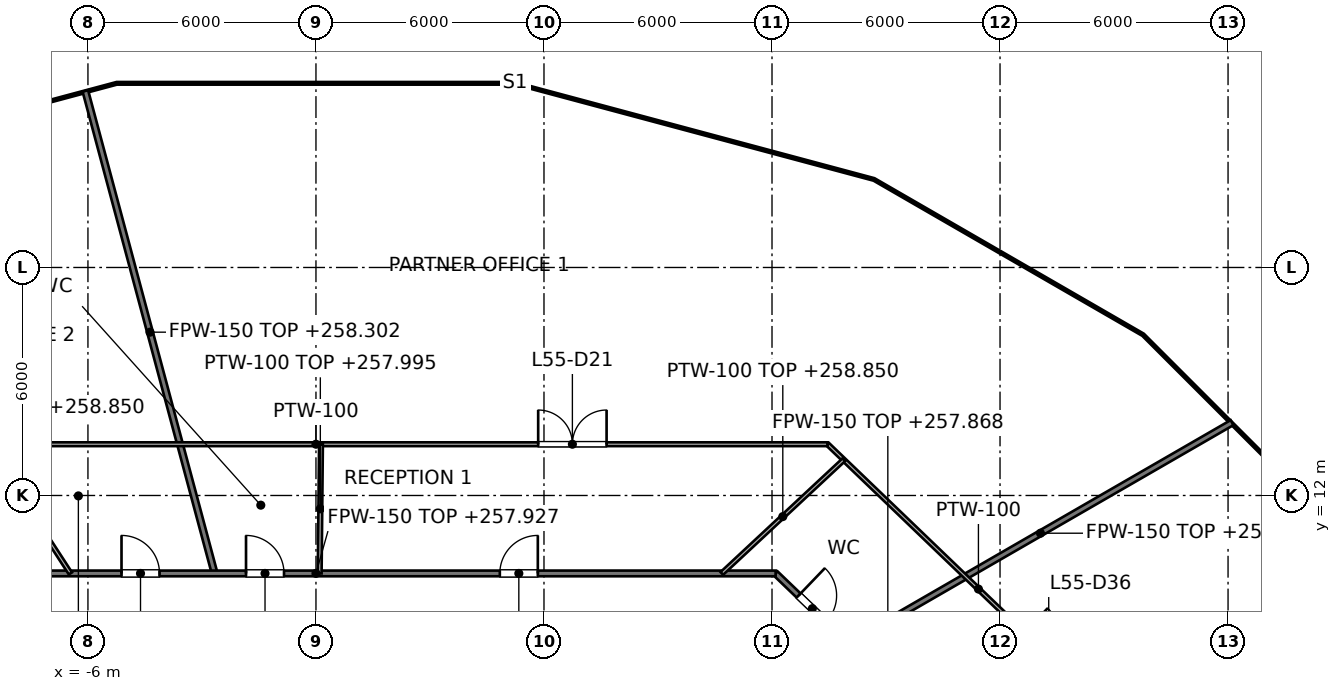
"""IFC4 building model, lengths in metres.
Left out: names, types, materials, properties, quantities, classifications, styles, units other than length and angle.
Written with IfcOpenShell. Run it as: python <this file> out.ifc"""

import sys

from ifc_helpers import new_model, si_unit, direction, frame, frame_2d, origin, place, context, subcontext, project, spatial, rectangle, extrude, element, fill, save


model = new_model("IFC4")
c1 = context("Model", 3, precision=1e-05, world=origin(), true_north=direction((0.0, 1.0)))
c2 = subcontext(c1, "Body", "Model", "MODEL_VIEW")
j1 = project(units=[si_unit("LENGTHUNIT", "METRE"), si_unit("PLANEANGLEUNIT", "RADIAN")], contexts=[c1])
p1 = place(None, origin())
s1 = spatial("IfcSite", under=j1, at=p1, CompositionType="ELEMENT")
p2 = place(p1, origin())
s2 = spatial("IfcBuilding", under=s1, at=p2, CompositionType="ELEMENT")
p3 = place(p2, frame((0.0, 0.0, 255.0)))
s3 = spatial("IfcBuildingStorey", under=s2, at=p3, CompositionType="ELEMENT", Elevation=255.0)
p4 = place(p3, frame((-6.068, 22.646, 0.0), z_axis=(0.0, 0.0, 1.0), x_axis=(0.258814996199, -0.965926911181, 0.0)))
e1 = element("IfcWall", 1, at=p4, inside=s3, PredefinedType="PARTITIONING", context=c2, shape_type="SweptSolid", body=[
    extrude(rectangle(XDim=13.145, YDim=0.15, at=frame_2d((6.573, 0.0))), origin(), (0.0, 0.0, 1.0), 3.302),
])
p5 = place(p3, frame((12.095, 9.949, 0.0), z_axis=(0.0, 0.0, 1.0), x_axis=(0.721290181137, -0.692633001376, 0.0)))
e2 = element("IfcWall", 2, at=p5, inside=s3, PredefinedType="PARTITIONING", context=c2, shape_type="SweptSolid", body=[
    extrude(rectangle(XDim=8.187, YDim=0.15, at=frame_2d((4.094, 0.0))), origin(), (0.0, 0.0, 1.0), 2.868),
])
p6 = place(p5, frame((0.839, 0.0, 0.0)))
e3 = element("IfcOpeningElement", 3, at=p6, cuts=e2, PredefinedType="OPENING", context=c2, shape_type="SweptSolid", body=[
    extrude(rectangle(XDim=1.0, YDim=2.1, at=frame_2d((0.5, 1.05))), frame((0.0, 0.075, 0.0), z_axis=(0.0, -1.0, 0.0), x_axis=(1.0, 0.0, 0.0)), (0.0, 0.0, 1.0), 0.15),
])
p7 = place(p5, frame((3.542, 0.0, 0.0)))
e4 = element("IfcOpeningElement", 4, at=p7, cuts=e2, PredefinedType="OPENING", context=c2, shape_type="SweptSolid", body=[
    extrude(rectangle(XDim=1.0, YDim=2.1, at=frame_2d((0.5, 1.05))), frame((0.0, 0.075, 0.0), z_axis=(0.0, -1.0, 0.0), x_axis=(1.0, 0.0, 0.0)), (0.0, 0.0, 1.0), 0.15),
])
p8 = place(p3, frame((-12.095, 9.949, 0.0), z_axis=(0.0, 0.0, 1.0), x_axis=(1.0, 0.0, 0.0)))
e5 = element("IfcWall", 5, at=p8, inside=s3, PredefinedType="PARTITIONING", context=c2, shape_type="SweptSolid", body=[
    extrude(rectangle(XDim=24.19, YDim=0.15, at=frame_2d((12.095, 0.0))), origin(), (0.0, 0.0, 1.0), 2.927),
])
p9 = place(p8, frame((16.933, 0.0, 0.0)))
e6 = element("IfcOpeningElement", 6, at=p9, cuts=e5, PredefinedType="OPENING", context=c2, shape_type="SweptSolid", body=[
    extrude(rectangle(XDim=1.0, YDim=2.1, at=frame_2d((0.5, 1.05))), frame((0.0, 0.075, 0.0), z_axis=(0.0, -1.0, 0.0), x_axis=(1.0, 0.0, 0.0)), (0.0, 0.0, 1.0), 0.15),
])
p10 = place(p8, frame((10.255, 0.0, 0.0)))
e7 = element("IfcOpeningElement", 7, at=p10, cuts=e5, PredefinedType="OPENING", context=c2, shape_type="SweptSolid", body=[
    extrude(rectangle(XDim=1.0, YDim=2.1, at=frame_2d((0.5, 1.05))), frame((0.0, 0.075, 0.0), z_axis=(0.0, -1.0, 0.0), x_axis=(1.0, 0.0, 0.0)), (0.0, 0.0, 1.0), 0.15),
])
p11 = place(p8, frame((6.978, 0.0, 0.0)))
e8 = element("IfcOpeningElement", 8, at=p11, cuts=e5, PredefinedType="OPENING", context=c2, shape_type="SweptSolid", body=[
    extrude(rectangle(XDim=1.0, YDim=2.1, at=frame_2d((0.5, 1.05))), frame((0.0, 0.075, 0.0), z_axis=(0.0, -1.0, 0.0), x_axis=(1.0, 0.0, 0.0)), (0.0, 0.0, 1.0), 0.15),
])
p12 = place(p8, frame((2.317, 0.0, 0.0)))
e9 = element("IfcOpeningElement", 9, at=p12, cuts=e5, PredefinedType="OPENING", context=c2, shape_type="SweptSolid", body=[
    extrude(rectangle(XDim=1.0, YDim=2.1, at=frame_2d((0.5, 1.05))), frame((0.0, 0.075, 0.0), z_axis=(0.0, -1.0, 0.0), x_axis=(1.0, 0.0, 0.0)), (0.0, 0.0, 1.0), 0.15),
])
p13 = place(p3, frame((14.024, 8.097, 0.0), z_axis=(0.0, 0.0, 1.0), x_axis=(0.866019681863, 0.500009910528, 0.0)))
e10 = element("IfcWall", 10, at=p13, inside=s3, PredefinedType="PARTITIONING", context=c2, shape_type="SweptSolid", body=[
    extrude(rectangle(XDim=11.64, YDim=0.15, at=frame_2d((5.82, 0.0))), origin(), (0.0, 0.0, 1.0), 3.076),
])
p14 = place(p3, frame((-8.669, 13.349, 0.0), z_axis=(0.0, 0.0, 1.0), x_axis=(0.544626347019, -0.83867880749, 0.0)))
e11 = element("IfcWall", 11, at=p14, inside=s3, PredefinedType="PARTITIONING", context=c2, shape_type="SweptSolid", body=[
    extrude(rectangle(XDim=4.054, YDim=0.1, at=frame_2d((2.027, 0.0))), origin(), (0.0, 0.0, 1.0), 3.85),
])
p15 = place(p3, frame((13.463, 13.349, 0.0), z_axis=(0.0, 0.0, 1.0), x_axis=(0.721293766873, -0.692629267264, 0.0)))
e12 = element("IfcWall", 12, at=p15, inside=s3, PredefinedType="PARTITIONING", context=c2, shape_type="SweptSolid", body=[
    extrude(rectangle(XDim=11.004, YDim=0.1, at=frame_2d((5.502, 0.0))), origin(), (0.0, 0.0, 1.0), 2.927),
])
p16 = place(p15, frame((7.166, 0.0, 0.0)))
e13 = element("IfcOpeningElement", 13, at=p16, cuts=e12, PredefinedType="OPENING", context=c2, shape_type="SweptSolid", body=[
    extrude(rectangle(XDim=1.8, YDim=2.1, at=frame_2d((0.9, 1.05))), frame((0.0, 0.05, 0.0), z_axis=(0.0, -1.0, 0.0), x_axis=(1.0, 0.0, 0.0)), (0.0, 0.0, 1.0), 0.1),
])
p17 = place(p3, frame((-13.463, 13.349, 0.0), z_axis=(0.0, 0.0, 1.0), x_axis=(1.0, 0.0, 0.0)))
e14 = element("IfcWall", 14, at=p17, inside=s3, PredefinedType="PARTITIONING", context=c2, shape_type="SweptSolid", body=[
    extrude(rectangle(XDim=26.926, YDim=0.1, at=frame_2d((13.463, 0.0))), origin(), (0.0, 0.0, 1.0), 2.927),
])
p18 = place(p17, frame((19.31, 0.0, 0.0)))
e15 = element("IfcOpeningElement", 15, at=p18, cuts=e14, PredefinedType="OPENING", context=c2, shape_type="SweptSolid", body=[
    extrude(rectangle(XDim=1.8, YDim=2.1, at=frame_2d((0.9, 1.05))), frame((0.0, 0.05, 0.0), z_axis=(0.0, -1.0, 0.0), x_axis=(1.0, 0.0, 0.0)), (0.0, 0.0, 1.0), 0.1),
])
p19 = place(p3, frame((10.679, 9.949, 0.0), z_axis=(0.0, 0.0, 1.0), x_axis=(0.731623098171, 0.681709353187, 0.0)))
e16 = element("IfcWall", 16, at=p19, inside=s3, PredefinedType="PARTITIONING", context=c2, shape_type="SweptSolid", body=[
    extrude(rectangle(XDim=4.387, YDim=0.1, at=frame_2d((2.194, 0.0))), origin(), (0.0, 0.0, 1.0), 3.85),
])
p20 = place(p3, frame((0.098, 9.949, 0.0), z_axis=(0.0, 0.0, 1.0), x_axis=(0.010051908305, 0.999949478293, 0.0)))
e17 = element("IfcWall", 17, at=p20, inside=s3, PredefinedType="PARTITIONING", context=c2, shape_type="SweptSolid", body=[
    extrude(rectangle(XDim=3.4, YDim=0.1, at=frame_2d((1.7, 0.0))), origin(), (0.0, 0.0, 1.0), 2.995),
])
p21 = place(p6, origin())
e18 = element("IfcDoor", 18, at=p21, inside=s3, OperationType="SINGLE_SWING_LEFT", PredefinedType="DOOR", context=c2, shape_type="SweptSolid", body=[
    extrude(rectangle(XDim=1.0, YDim=2.1, at=frame_2d((0.5, 1.05))), frame((0.0, 0.025, 0.0), z_axis=(0.0, -1.0, 0.0), x_axis=(1.0, 0.0, 0.0)), (0.0, 0.0, 1.0), 0.05),
])
fill(e3, e18)
p22 = place(p9, origin())
e19 = element("IfcDoor", 19, at=p22, inside=s3, OperationType="SINGLE_SWING_RIGHT", PredefinedType="DOOR", context=c2, shape_type="SweptSolid", body=[
    extrude(rectangle(XDim=1.0, YDim=2.1, at=frame_2d((0.5, 1.05))), frame((0.0, 0.025, 0.0), z_axis=(0.0, -1.0, 0.0), x_axis=(1.0, 0.0, 0.0)), (0.0, 0.0, 1.0), 0.05),
])
fill(e6, e19)
p23 = place(p10, origin())
e20 = element("IfcDoor", 20, at=p23, inside=s3, OperationType="SINGLE_SWING_LEFT", PredefinedType="DOOR", context=c2, shape_type="SweptSolid", body=[
    extrude(rectangle(XDim=1.0, YDim=2.1, at=frame_2d((0.5, 1.05))), frame((0.0, 0.025, 0.0), z_axis=(0.0, -1.0, 0.0), x_axis=(1.0, 0.0, 0.0)), (0.0, 0.0, 1.0), 0.05),
])
fill(e7, e20)
p24 = place(p18, origin())
e21 = element("IfcDoor", 21, at=p24, inside=s3, OperationType="DOUBLE_DOOR_SINGLE_SWING", PredefinedType="DOOR", context=c2, shape_type="SweptSolid", body=[
    extrude(rectangle(XDim=1.8, YDim=2.1, at=frame_2d((0.9, 1.05))), frame((0.0, 0.025, 0.0), z_axis=(0.0, -1.0, 0.0), x_axis=(1.0, 0.0, 0.0)), (0.0, 0.0, 1.0), 0.05),
])
fill(e15, e21)
p25 = place(p11, origin())
e22 = element("IfcDoor", 22, at=p25, inside=s3, OperationType="SINGLE_SWING_LEFT", PredefinedType="DOOR", context=c2, shape_type="SweptSolid", body=[
    extrude(rectangle(XDim=1.0, YDim=2.1, at=frame_2d((0.5, 1.05))), frame((0.0, 0.025, 0.0), z_axis=(0.0, -1.0, 0.0), x_axis=(1.0, 0.0, 0.0)), (0.0, 0.0, 1.0), 0.05),
])
fill(e8, e22)
save(model, sys.argv[1])
